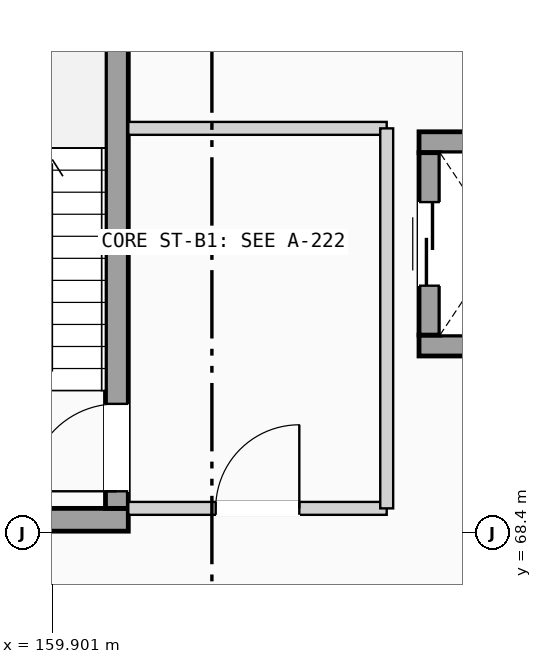
"""IFC4 building model, lengths in metres.
Left out: names, types, materials, properties, quantities, classifications, styles, units other than length and angle.
Written with IfcOpenShell. Run it as: python <this file> out.ifc"""

import sys

from ifc_helpers import new_model, si_unit, direction, frame, frame_2d, origin, place, context, subcontext, project, spatial, rectangle, extrude, element, fill, save


model = new_model("IFC4")
c1 = context("Model", 3, precision=1e-05, world=origin(), true_north=direction((0.0, 1.0)))
c2 = subcontext(c1, "Body", "Model", "MODEL_VIEW")
j1 = project(units=[si_unit("LENGTHUNIT", "METRE"), si_unit("PLANEANGLEUNIT", "RADIAN")], contexts=[c1])
p1 = place(None, origin())
s1 = spatial("IfcSite", under=j1, at=p1, CompositionType="ELEMENT")
p2 = place(p1, origin())
s2 = spatial("IfcBuilding", under=s1, at=p2, CompositionType="ELEMENT")
p3 = place(p2, frame((0.0, 0.0, -4.2)))
s3 = spatial("IfcBuildingStorey", under=s2, at=p3, CompositionType="ELEMENT", Elevation=-4.2)
p4 = place(p3, frame((156.975, 68.57, 0.0), z_axis=(0.0, 0.0, 1.0), x_axis=(1.0, 0.0, 0.0)))
e1 = element("IfcWall", 1, at=p4, inside=s3, PredefinedType="SHEAR", context=c2, shape_type="SweptSolid", body=[
    extrude(rectangle(XDim=3.925, YDim=0.3, at=frame_2d((1.962, 0.0))), origin(), (0.0, 0.0, 1.0), 3.92),
])
p5 = place(p3, frame((160.75, 68.72, 0.0), z_axis=(0.0, 0.0, 1.0), x_axis=(0.0, 1.0, 0.0)))
e2 = element("IfcWall", 2, at=p5, inside=s3, PredefinedType="SHEAR", context=c2, shape_type="SweptSolid", body=[
    extrude(rectangle(XDim=7.0, YDim=0.3, at=frame_2d((3.5, 0.0))), origin(), (0.0, 0.0, 1.0), 3.92),
])
p6 = place(p5, frame((0.225, 0.0, 0.0)))
e3 = element("IfcOpeningElement", 3, at=p6, cuts=e2, PredefinedType="OPENING", context=c2, shape_type="SweptSolid", body=[
    extrude(rectangle(XDim=1.15, YDim=2.12, at=frame_2d((0.575, 1.06))), frame((0.0, 0.16, 0.0), z_axis=(0.0, -1.0, 0.0), x_axis=(1.0, 0.0, 0.0)), (0.0, 0.0, 1.0), 0.32),
])
for number, where, z_axis, x_axis in (
    (4, (164.725, 70.863, 0.0), (0.0, 0.0, 1.0), (1.0, 0.0, 0.0)),
    (5, (164.725, 73.538, 0.0), (0.0, 0.0, 1.0), (1.0, 0.0, 0.0)),
):
    element("IfcWall", number, at=place(p3, frame(where, z_axis=z_axis, x_axis=x_axis)), inside=s3, PredefinedType="SHEAR", context=c2, shape_type="SweptSolid", body=[
        extrude(rectangle(XDim=2.15, YDim=0.275, at=frame_2d((1.075, 0.0))), origin(), (0.0, 0.0, 1.0), 3.92),
    ])
p7 = place(p3, frame((164.863, 71.0, 0.0), z_axis=(0.0, 0.0, 1.0), x_axis=(0.0, 1.0, 0.0)))
e6 = element("IfcWall", 6, at=p7, inside=s3, PredefinedType="SHEAR", context=c2, shape_type="SweptSolid", body=[
    extrude(rectangle(XDim=2.4, YDim=0.275, at=frame_2d((1.2, 0.0))), origin(), (0.0, 0.0, 1.0), 3.92),
])
p8 = place(p7, frame((0.65, 0.0, 0.0)))
e7 = element("IfcOpeningElement", 7, at=p8, cuts=e6, PredefinedType="OPENING", context=c2, shape_type="SweptSolid", body=[
    extrude(rectangle(XDim=1.1, YDim=2.15, at=frame_2d((0.55, 1.075))), frame((0.0, 0.147, 0.0), z_axis=(0.0, -1.0, 0.0), x_axis=(1.0, 0.0, 0.0)), (0.0, 0.0, 1.0), 0.295),
])
p9 = place(p3, frame((160.9, 68.72, 0.0), z_axis=(0.0, 0.0, 1.0), x_axis=(1.0, 0.0, 0.0)))
e8 = element("IfcWall", 8, at=p9, inside=s3, PredefinedType="PARTITIONING", context=c2, shape_type="SweptSolid", body=[
    extrude(rectangle(XDim=3.4, YDim=0.17, at=frame_2d((1.7, 0.0))), origin(), (0.0, 0.0, 1.0), 3.19),
])
p10 = place(p9, frame((1.15, 0.0, 0.0)))
e9 = element("IfcOpeningElement", 9, at=p10, cuts=e8, PredefinedType="OPENING", context=c2, shape_type="SweptSolid", body=[
    extrude(rectangle(XDim=1.1, YDim=2.12, at=frame_2d((0.55, 1.06))), frame((0.0, 0.095, 0.0), z_axis=(0.0, -1.0, 0.0), x_axis=(1.0, 0.0, 0.0)), (0.0, 0.0, 1.0), 0.19),
])
p11 = place(p3, frame((160.9, 73.72, 0.0), z_axis=(0.0, 0.0, 1.0), x_axis=(1.0, 0.0, 0.0)))
e10 = element("IfcWall", 10, at=p11, inside=s3, PredefinedType="PARTITIONING", context=c2, shape_type="SweptSolid", body=[
    extrude(rectangle(XDim=3.4, YDim=0.17, at=frame_2d((1.7, 0.0))), origin(), (0.0, 0.0, 1.0), 3.84),
])
p12 = place(p3, frame((164.3, 68.72, 0.0), z_axis=(0.0, 0.0, 1.0), x_axis=(0.0, 1.0, 0.0)))
e11 = element("IfcWall", 11, at=p12, inside=s3, PredefinedType="PARTITIONING", context=c2, shape_type="SweptSolid", body=[
    extrude(rectangle(XDim=5.0, YDim=0.17, at=frame_2d((2.5, 0.0))), origin(), (0.0, 0.0, 1.0), 3.84),
])
p13 = place(p6, origin())
e12 = element("IfcDoor", 12, at=p13, inside=s3, OperationType="SINGLE_SWING_LEFT", PredefinedType="DOOR", context=c2, shape_type="SweptSolid", body=[
    extrude(rectangle(XDim=1.15, YDim=2.12, at=frame_2d((0.575, 1.06))), frame((0.0, 0.025, 0.0), z_axis=(0.0, -1.0, 0.0), x_axis=(1.0, 0.0, 0.0)), (0.0, 0.0, 1.0), 0.05),
])
fill(e3, e12)
p14 = place(p8, origin())
e13 = element("IfcDoor", 13, at=p14, inside=s3, OperationType="SLIDING_TO_LEFT", PredefinedType="DOOR", context=c2, shape_type="SweptSolid", body=[
    extrude(rectangle(XDim=1.1, YDim=2.15, at=frame_2d((0.55, 1.075))), frame((0.0, 0.025, 0.0), z_axis=(0.0, -1.0, 0.0), x_axis=(1.0, 0.0, 0.0)), (0.0, 0.0, 1.0), 0.05),
])
fill(e7, e13)
p15 = place(p10, origin())
e14 = element("IfcDoor", 14, at=p15, inside=s3, OperationType="SINGLE_SWING_RIGHT", PredefinedType="DOOR", context=c2, shape_type="SweptSolid", body=[
    extrude(rectangle(XDim=1.1, YDim=2.12, at=frame_2d((0.55, 1.06))), frame((0.0, 0.025, 0.0), z_axis=(0.0, -1.0, 0.0), x_axis=(1.0, 0.0, 0.0)), (0.0, 0.0, 1.0), 0.05),
])
fill(e9, e14)
save(model, sys.argv[1])
